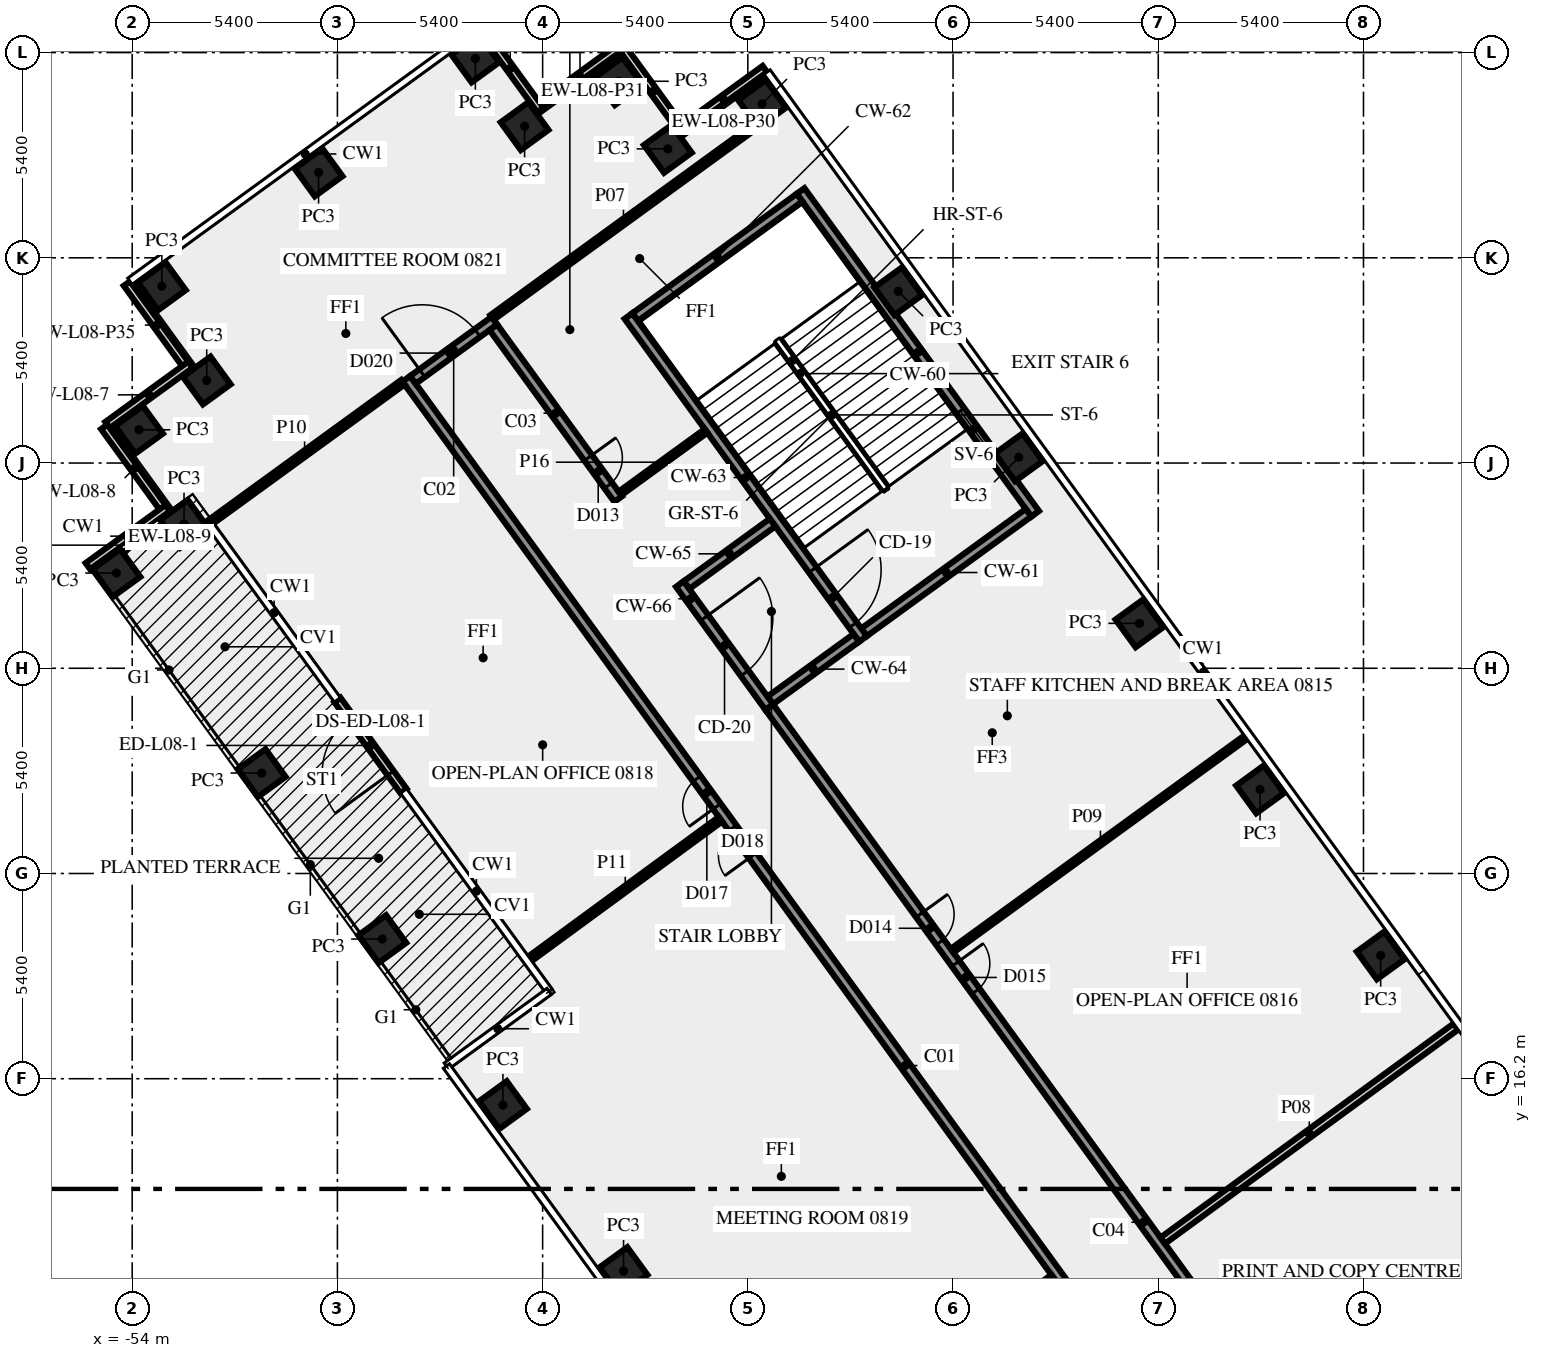
"""IFC4 building model, lengths in metres.
Left out: names, types, materials, properties, quantities, classifications, styles, units other than length and angle.
Written with IfcOpenShell. Run it as: python <this file> out.ifc"""

import sys

from ifc_helpers import new_model, si_unit, direction, frame, frame_2d, origin, origin_2d, place, context, subcontext, project, spatial, rectangle, extrude, element, fill, save


model = new_model("IFC4")
c1 = context("Model", 3, precision=1e-05, world=origin(), true_north=direction((0.0, 1.0)))
c2 = subcontext(c1, "Body", "Model", "MODEL_VIEW")
j1 = project(units=[si_unit("LENGTHUNIT", "METRE"), si_unit("PLANEANGLEUNIT", "RADIAN")], contexts=[c1])
p1 = place(None, origin())
s1 = spatial("IfcSite", under=j1, at=p1, CompositionType="ELEMENT")
p2 = place(p1, origin())
s2 = spatial("IfcBuilding", under=s1, at=p2, CompositionType="ELEMENT")
p3 = place(p2, frame((0.0, 0.0, 39.0)))
s3 = spatial("IfcBuildingStorey", under=s2, at=p3, CompositionType="ELEMENT", Elevation=39.0)
for number, where, z_axis, x_axis in (
    (1, (-21.147, 19.444, 0.0), (0.0, 0.0, 1.0), (-0.588, 0.809, 0.0)),
    (2, (-24.321, 23.812, 0.0), (0.0, 0.0, 1.0), (-0.588, 0.809, 0.0)),
    (3, (-27.495, 28.181, 0.0), (0.0, 0.0, 1.0), (-0.588, 0.809, 0.0)),
    (4, (-30.669, 32.55, 0.0), (0.0, 0.0, 1.0), (-0.588, 0.809, 0.0)),
    (5, (-33.843, 36.919, 0.0), (0.0, 0.0, 1.0), (-0.588, 0.809, 0.0)),
    (6, (-37.425, 41.85, 0.0), (0.0, 0.0, 1.0), (-0.588, 0.809, 0.0)),
    (7, (-39.906, 40.666, 0.0), (0.0, 0.0, 1.0), (-0.588, 0.809, 0.0)),
    (8, (-41.2, 42.445, 0.0), (0.0, 0.0, 1.0), (-0.588, 0.809, 0.0)),
    (9, (-43.675, 41.265, 0.0), (0.0, 0.0, 1.0), (-0.809, -0.588, 0.0)),
    (10, (-44.97, 43.045, 0.0), (0.0, 0.0, 1.0), (-0.809, -0.588, 0.0)),
    (11, (-49.096, 40.047, 0.0), (0.0, 0.0, 1.0), (-0.809, -0.588, 0.0)),
    (12, (-53.22, 37.05, 0.0), (0.0, 0.0, 1.0), (0.588, -0.809, 0.0)),
    (13, (-52.039, 34.571, 0.0), (0.0, 0.0, 1.0), (-0.809, -0.588, 0.0)),
    (14, (-53.82, 33.275, 0.0), (0.0, 0.0, 1.0), (0.588, -0.809, 0.0)),
    (15, (-52.636, 30.8, 0.0), (0.0, 0.0, 1.0), (-0.809, -0.588, 0.0)),
    (16, (-54.415, 29.505, 0.0), (0.0, 0.0, 1.0), (0.588, -0.809, 0.0)),
    (17, (-50.592, 24.243, 0.0), (0.0, 0.0, 1.0), (0.588, -0.809, 0.0)),
    (18, (-47.418, 19.875, 0.0), (0.0, 0.0, 1.0), (0.588, -0.809, 0.0)),
    (19, (-44.244, 15.506, 0.0), (0.0, 0.0, 1.0), (0.588, -0.809, 0.0)),
    (20, (-41.07, 11.137, 0.0), (0.0, 0.0, 1.0), (0.588, -0.809, 0.0)),
):
    element("IfcColumn", number, at=place(p3, frame(where, z_axis=z_axis, x_axis=x_axis)), inside=s3, PredefinedType="COLUMN", context=c2, shape_type="SweptSolid", body=[
        extrude(rectangle(XDim=0.9, YDim=0.9, at=origin_2d()), origin(), (0.0, 0.0, 1.0), 3.65),
    ])
p4 = place(p3, frame((-37.353, 42.768, 0.0), z_axis=(0.0, 0.0, 1.0), x_axis=(-0.809033161865, -0.587762999008, 0.0)))
e21 = element("IfcWall", 21, at=p4, inside=s3, PredefinedType="SOLIDWALL", context=c2, shape_type="SweptSolid", body=[
    extrude(rectangle(XDim=2.7, YDim=0.2, at=frame_2d((1.35, 0.0))), origin(), (0.0, 0.0, 1.0), 3.65),
])
p5 = place(p3, frame((-39.488, 41.094, 0.0), z_axis=(0.0, 0.0, 1.0), x_axis=(-0.587806000234, 0.809001919707, 0.0)))
e22 = element("IfcWall", 22, at=p5, inside=s3, PredefinedType="SOLIDWALL", context=c2, shape_type="SweptSolid", body=[
    extrude(rectangle(XDim=2.7, YDim=0.2, at=frame_2d((1.35, 0.0))), origin(), (0.0, 0.0, 1.0), 3.65),
])
for number, where, z_axis, x_axis in (
    (23, (-41.124, 43.366, 0.0), (0.0, 0.0, 1.0), (-0.809, -0.588, 0.0)),
    (24, (-43.259, 41.691, 0.0), (0.0, 0.0, 1.0), (-0.588, 0.809, 0.0)),
    (25, (-54.14, 37.123, 0.0), (0.0, 0.0, 1.0), (0.588, -0.809, 0.0)),
):
    element("IfcWall", number, at=place(p3, frame(where, z_axis=z_axis, x_axis=x_axis)), inside=s3, PredefinedType="SOLIDWALL", context=c2, shape_type="SweptSolid", body=[
        extrude(rectangle(XDim=2.7, YDim=0.2, at=frame_2d((1.35, 0.0))), origin(), (0.0, 0.0, 1.0), 3.65),
    ])
p6 = place(p3, frame((-46.859, 23.771, 0.0), z_axis=(0.0, 0.0, 1.0), x_axis=(-0.587789508047, 0.809013902371, 0.0)))
e26 = element("IfcWall", 26, at=p6, inside=s3, PredefinedType="SOLIDWALL", context=c2, shape_type="SweptSolid", body=[
    extrude(rectangle(XDim=2.963, YDim=0.2, at=frame_2d((1.481, 0.0))), origin(), (0.0, 0.0, 1.0), 3.65),
])
p7 = place(p6, frame((0.582, 0.0, 0.0)))
e27 = element("IfcOpeningElement", 27, at=p7, cuts=e26, PredefinedType="OPENING", context=c2, shape_type="SweptSolid", body=[
    extrude(rectangle(XDim=1.8, YDim=2.4, at=frame_2d((0.9, 1.2))), frame((0.0, 0.11, 0.0), z_axis=(0.0, -1.0, 0.0), x_axis=(1.0, 0.0, 0.0)), (0.0, 0.0, 1.0), 0.22),
])
p8 = place(p3, frame((-52.465, 34.987, 0.0), z_axis=(0.0, 0.0, 1.0), x_axis=(-0.809033161865, -0.587762999008, 0.0)))
e28 = element("IfcWall", 28, at=p8, inside=s3, PredefinedType="SOLIDWALL", context=c2, shape_type="SweptSolid", body=[
    extrude(rectangle(XDim=2.7, YDim=0.2, at=frame_2d((1.35, 0.0))), origin(), (0.0, 0.0, 1.0), 3.65),
])
p9 = place(p3, frame((-54.738, 33.351, 0.0), z_axis=(0.0, 0.0, 1.0), x_axis=(0.587779184282, -0.809021403008, 0.0)))
e29 = element("IfcWall", 29, at=p9, inside=s3, PredefinedType="SOLIDWALL", context=c2, shape_type="SweptSolid", body=[
    extrude(rectangle(XDim=2.7, YDim=0.2, at=frame_2d((1.35, 0.0))), origin(), (0.0, 0.0, 1.0), 3.65),
])
p10 = place(p3, frame((-53.063, 31.216, 0.0), z_axis=(0.0, 0.0, 1.0), x_axis=(-0.80902431253, -0.587775179585, 0.0)))
e30 = element("IfcWall", 30, at=p10, inside=s3, PredefinedType="SOLIDWALL", context=c2, shape_type="SweptSolid", body=[
    extrude(rectangle(XDim=2.6, YDim=0.2, at=frame_2d((1.3, 0.0))), origin(), (0.0, 0.0, 1.0), 3.65),
])
p11 = place(p3, frame((-30.24, 31.064, 0.0), z_axis=(0.0, 0.0, 1.0), x_axis=(-0.587795589702, 0.809009483706, 0.0)))
e31 = element("IfcWall", 31, at=p11, inside=s3, PredefinedType="SHEAR", context=c2, shape_type="SweptSolid", body=[
    extrude(rectangle(XDim=10.5, YDim=0.25, at=frame_2d((5.25, 0.0))), origin(), (0.0, 0.0, 1.0), 3.65),
])
p12 = place(p11, frame((2.15, 0.0, 1.0)))
e32 = element("IfcOpeningElement", 32, at=p12, cuts=e31, PredefinedType="OPENING", context=c2, shape_type="SweptSolid", body=[
    extrude(rectangle(XDim=1.2, YDim=1.2, at=frame_2d((0.6, 0.6))), frame((0.0, 0.135, 0.0), z_axis=(0.0, -1.0, 0.0), x_axis=(1.0, 0.0, 0.0)), (0.0, 0.0, 1.0), 0.27),
])
p13 = place(p3, frame((-30.414, 31.092, 0.0), z_axis=(0.0, 0.0, 1.0), x_axis=(-0.8089984606, -0.587810760999, 0.0)))
e33 = element("IfcWall", 33, at=p13, inside=s3, PredefinedType="SHEAR", context=c2, shape_type="SweptSolid", body=[
    extrude(rectangle(XDim=5.35, YDim=0.25, at=frame_2d((2.675, 0.0))), origin(), (0.0, 0.0, 1.0), 3.65),
])
p14 = place(p3, frame((-36.439, 39.384, 0.0), z_axis=(0.0, 0.0, 1.0), x_axis=(-0.809020161303, -0.587780893365, 0.0)))
e34 = element("IfcWall", 34, at=p14, inside=s3, PredefinedType="SHEAR", context=c2, shape_type="SweptSolid", body=[
    extrude(rectangle(XDim=5.35, YDim=0.25, at=frame_2d((2.675, 0.0))), origin(), (0.0, 0.0, 1.0), 3.65),
])
p15 = place(p3, frame((-40.942, 36.267, 0.0), z_axis=(0.0, 0.0, 1.0), x_axis=(0.587795589702, -0.809009483706, 0.0)))
e35 = element("IfcWall", 35, at=p15, inside=s3, PredefinedType="SHEAR", context=c2, shape_type="SweptSolid", body=[
    extrude(rectangle(XDim=10.5, YDim=0.25, at=frame_2d((5.25, 0.0))), origin(), (0.0, 0.0, 1.0), 3.65),
])
p16 = place(p15, frame((8.25, 0.0, 0.0)))
e36 = element("IfcOpeningElement", 36, at=p16, cuts=e35, PredefinedType="OPENING", context=c2, shape_type="SweptSolid", body=[
    extrude(rectangle(XDim=1.8, YDim=2.1, at=frame_2d((0.9, 1.05))), frame((0.0, 0.135, 0.0), z_axis=(0.0, -1.0, 0.0), x_axis=(1.0, 0.0, 0.0)), (0.0, 0.0, 1.0), 0.27),
])
for number, where, z_axis, x_axis in (
    (37, (-34.945, 27.8, 0.0), (0.0, 0.0, 1.0), (-0.809, -0.588, 0.0)),
    (38, (-37.149, 30.834, 0.0), (0.0, 0.0, 1.0), (-0.809, -0.588, 0.0)),
):
    element("IfcWall", number, at=place(p3, frame(where, z_axis=z_axis, x_axis=x_axis)), inside=s3, PredefinedType="SHEAR", context=c2, shape_type="SweptSolid", body=[
        extrude(rectangle(XDim=2.8, YDim=0.25, at=frame_2d((1.4, 0.0))), origin(), (0.0, 0.0, 1.0), 3.65),
    ])
p17 = place(p3, frame((-39.589, 29.216, 0.0), z_axis=(0.0, 0.0, 1.0), x_axis=(0.587772420479, -0.809026317077, 0.0)))
e39 = element("IfcWall", 39, at=p17, inside=s3, PredefinedType="SHEAR", context=c2, shape_type="SweptSolid", body=[
    extrude(rectangle(XDim=4.0, YDim=0.25, at=frame_2d((2.0, 0.0))), origin(), (0.0, 0.0, 1.0), 3.65),
])
p18 = place(p17, frame((1.1, 0.0, 0.0)))
e40 = element("IfcOpeningElement", 40, at=p18, cuts=e39, PredefinedType="OPENING", context=c2, shape_type="SweptSolid", body=[
    extrude(rectangle(XDim=1.8, YDim=2.1, at=frame_2d((0.9, 1.05))), frame((0.0, 0.135, 0.0), z_axis=(0.0, -1.0, 0.0), x_axis=(1.0, 0.0, 0.0)), (0.0, 0.0, 1.0), 0.27),
])
p19 = place(p3, frame((-20.531, -1.523, 0.0), z_axis=(0.0, 0.0, 1.0), x_axis=(-0.587784593204, 0.809017473231, 0.0)))
e41 = element("IfcWall", 41, at=p19, inside=s3, PredefinedType="SOLIDWALL", context=c2, shape_type="SweptSolid", body=[
    extrude(rectangle(XDim=44.67, YDim=0.25, at=frame_2d((22.335, 0.0))), origin(), (0.0, 0.0, 1.0), 3.65),
])
p20 = place(p19, frame((30.765, 0.0, 0.0)))
e42 = element("IfcOpeningElement", 42, at=p20, cuts=e41, PredefinedType="OPENING", context=c2, shape_type="SweptSolid", body=[
    extrude(rectangle(XDim=0.9, YDim=2.1, at=frame_2d((0.45, 1.05))), frame((0.0, 0.135, 0.0), z_axis=(0.0, -1.0, 0.0), x_axis=(1.0, 0.0, 0.0)), (0.0, 0.0, 1.0), 0.27),
])
p21 = place(p19, frame((14.316, 0.0, 0.0)))
e43 = element("IfcOpeningElement", 43, at=p21, cuts=e41, PredefinedType="OPENING", context=c2, shape_type="SweptSolid", body=[
    extrude(rectangle(XDim=0.9, YDim=2.1, at=frame_2d((0.45, 1.05))), frame((0.0, 0.135, 0.0), z_axis=(0.0, -1.0, 0.0), x_axis=(1.0, 0.0, 0.0)), (0.0, 0.0, 1.0), 0.27),
])
p22 = place(p19, frame((29.166, 0.0, 0.0)))
e44 = element("IfcOpeningElement", 44, at=p22, cuts=e41, PredefinedType="OPENING", context=c2, shape_type="SweptSolid", body=[
    extrude(rectangle(XDim=0.9, YDim=2.1, at=frame_2d((0.45, 1.05))), frame((0.0, 0.135, 0.0), z_axis=(0.0, -1.0, 0.0), x_axis=(1.0, 0.0, 0.0)), (0.0, 0.0, 1.0), 0.27),
])
p23 = place(p3, frame((-46.613, 34.588, 0.0), z_axis=(0.0, 0.0, 1.0), x_axis=(0.808994936898, 0.587815610607, 0.0)))
e45 = element("IfcWall", 45, at=p23, inside=s3, PredefinedType="SOLIDWALL", context=c2, shape_type="SweptSolid", body=[
    extrude(rectangle(XDim=2.65, YDim=0.25, at=frame_2d((1.325, 0.0))), origin(), (0.0, 0.0, 1.0), 3.65),
])
p24 = place(p23, frame((0.299, 0.0, 0.0)))
e46 = element("IfcOpeningElement", 46, at=p24, cuts=e45, PredefinedType="OPENING", context=c2, shape_type="SweptSolid", body=[
    extrude(rectangle(XDim=1.8, YDim=2.1, at=frame_2d((0.9, 1.05))), frame((0.0, 0.135, 0.0), z_axis=(0.0, -1.0, 0.0), x_axis=(1.0, 0.0, 0.0)), (0.0, 0.0, 1.0), 0.27),
])
p25 = place(p3, frame((-44.497, 35.971, 0.0), z_axis=(0.0, 0.0, 1.0), x_axis=(0.587742866856, -0.809047787501, 0.0)))
e47 = element("IfcWall", 47, at=p25, inside=s3, PredefinedType="SOLIDWALL", context=c2, shape_type="SweptSolid", body=[
    extrude(rectangle(XDim=5.586, YDim=0.25, at=frame_2d((2.793, 0.0))), origin(), (0.0, 0.0, 1.0), 3.65),
])
p26 = place(p25, frame((4.245, 0.0, 0.0)))
e48 = element("IfcOpeningElement", 48, at=p26, cuts=e47, PredefinedType="OPENING", context=c2, shape_type="SweptSolid", body=[
    extrude(rectangle(XDim=0.9, YDim=2.1, at=frame_2d((0.45, 1.05))), frame((0.0, 0.135, 0.0), z_axis=(0.0, -1.0, 0.0), x_axis=(1.0, 0.0, 0.0)), (0.0, 0.0, 1.0), 0.27),
])
p27 = place(p3, frame((-37.232, 25.972, 0.0), z_axis=(0.0, 0.0, 1.0), x_axis=(0.587786323093, -0.809016216391, 0.0)))
e49 = element("IfcWall", 49, at=p27, inside=s3, PredefinedType="SOLIDWALL", context=c2, shape_type="SweptSolid", body=[
    extrude(rectangle(XDim=33.493, YDim=0.25, at=frame_2d((16.747, 0.0))), origin(), (0.0, 0.0, 1.0), 3.65),
])
p28 = place(p27, frame((8.335, 0.0, 0.0)))
e50 = element("IfcOpeningElement", 50, at=p28, cuts=e49, PredefinedType="OPENING", context=c2, shape_type="SweptSolid", body=[
    extrude(rectangle(XDim=0.9, YDim=2.1, at=frame_2d((0.45, 1.05))), frame((0.0, 0.135, 0.0), z_axis=(0.0, -1.0, 0.0), x_axis=(1.0, 0.0, 0.0)), (0.0, 0.0, 1.0), 0.27),
])
p29 = place(p27, frame((29.152, 0.0, 0.0)))
e51 = element("IfcOpeningElement", 51, at=p29, cuts=e49, PredefinedType="OPENING", context=c2, shape_type="SweptSolid", body=[
    extrude(rectangle(XDim=0.9, YDim=2.1, at=frame_2d((0.45, 1.05))), frame((0.0, 0.135, 0.0), z_axis=(0.0, -1.0, 0.0), x_axis=(1.0, 0.0, 0.0)), (0.0, 0.0, 1.0), 0.27),
])
p30 = place(p27, frame((6.735, 0.0, 0.0)))
e52 = element("IfcOpeningElement", 52, at=p30, cuts=e49, PredefinedType="OPENING", context=c2, shape_type="SweptSolid", body=[
    extrude(rectangle(XDim=0.9, YDim=2.1, at=frame_2d((0.45, 1.05))), frame((0.0, 0.135, 0.0), z_axis=(0.0, -1.0, 0.0), x_axis=(1.0, 0.0, 0.0)), (0.0, 0.0, 1.0), 0.27),
])
p31 = place(p3, frame((-37.614, 41.257, 0.0), z_axis=(0.0, 0.0, 1.0), x_axis=(-0.808968150799, -0.587852473834, 0.0)))
e53 = element("IfcWall", 53, at=p31, inside=s3, PredefinedType="PARTITIONING", context=c2, shape_type="SweptSolid", body=[
    extrude(rectangle(XDim=8.55, YDim=0.15, at=frame_2d((4.275, 0.0))), origin(), (0.0, 0.0, 1.0), 3.65),
])
p32 = place(p3, frame((-26.882, 11.94, 0.0), z_axis=(0.0, 0.0, 1.0), x_axis=(0.807664588563, 0.589642190131, 0.0)))
e54 = element("IfcWall", 54, at=p32, inside=s3, PredefinedType="SOLIDWALL", context=c2, shape_type="SweptSolid", body=[
    extrude(rectangle(XDim=9.55, YDim=0.2, at=frame_2d((4.775, 0.0))), origin(), (0.0, 0.0, 1.0), 2.75),
])
p33 = place(p3, frame((-24.618, 25.242, 0.0), z_axis=(0.0, 0.0, 1.0), x_axis=(-0.809002920164, -0.587804623294, 0.0)))
e55 = element("IfcWall", 55, at=p33, inside=s3, PredefinedType="PARTITIONING", context=c2, shape_type="SweptSolid", body=[
    extrude(rectangle(XDim=9.651, YDim=0.12, at=frame_2d((4.825, 0.0))), origin(), (0.0, 0.0, 1.0), 2.75),
])
p34 = place(p3, frame((-46.877, 34.526, 0.0), z_axis=(0.0, 0.0, 1.0), x_axis=(-0.808980373315, -0.587835653556, 0.0)))
e56 = element("IfcWall", 56, at=p34, inside=s3, PredefinedType="PARTITIONING", context=c2, shape_type="SweptSolid", body=[
    extrude(rectangle(XDim=6.394, YDim=0.15, at=frame_2d((3.197, 0.0))), origin(), (0.0, 0.0, 1.0), 3.65),
])
p35 = place(p3, frame((-43.529, 19.358, 0.0), z_axis=(0.0, 0.0, 1.0), x_axis=(0.806712484859, 0.590944131685, 0.0)))
e57 = element("IfcWall", 57, at=p35, inside=s3, PredefinedType="PARTITIONING", context=c2, shape_type="SweptSolid", body=[
    extrude(rectangle(XDim=6.207, YDim=0.15, at=frame_2d((3.104, 0.0))), origin(), (0.0, 0.0, 1.0), 3.65),
])
p36 = place(p3, frame((-29.769, 10.98, 0.0), z_axis=(0.0, 0.0, 1.0), x_axis=(-0.809036661777, -0.587758181483, 0.0)))
e58 = element("IfcWall", 58, at=p36, inside=s3, PredefinedType="PARTITIONING", context=c2, shape_type="SweptSolid", body=[
    extrude(rectangle(XDim=9.55, YDim=0.15, at=frame_2d((4.775, 0.0))), origin(), (0.0, 0.0, 1.0), 2.75),
])
p37 = place(p3, frame((-41.166, 31.599, 0.0), z_axis=(0.0, 0.0, 1.0), x_axis=(0.809090262332, 0.587684394381, 0.0)))
e59 = element("IfcWall", 59, at=p37, inside=s3, PredefinedType="PARTITIONING", context=c2, shape_type="SweptSolid", body=[
    extrude(rectangle(XDim=2.801, YDim=0.12, at=frame_2d((1.4, 0.0))), origin(), (0.0, 0.0, 1.0), 3.65),
])
p38 = place(p7, origin())
e60 = element("IfcDoor", 60, at=p38, inside=s3, OperationType="DOUBLE_DOOR_SINGLE_SWING", PredefinedType="DOOR", context=c2, shape_type="SweptSolid", body=[
    extrude(rectangle(XDim=1.8, YDim=2.4, at=frame_2d((0.9, 1.2))), frame((0.0, 0.025, 0.0), z_axis=(0.0, -1.0, 0.0), x_axis=(1.0, 0.0, 0.0)), (0.0, 0.0, 1.0), 0.05),
])
fill(e27, e60)
p39 = place(p12, origin())
e61 = element("IfcWindow", 61, at=p39, inside=s3, PartitioningType="SINGLE_PANEL", PredefinedType="WINDOW", context=c2, shape_type="SweptSolid", body=[
    extrude(rectangle(XDim=1.2, YDim=1.2, at=frame_2d((0.6, 0.6))), frame((0.0, 0.03, 0.0), z_axis=(0.0, -1.0, 0.0), x_axis=(1.0, 0.0, 0.0)), (0.0, 0.0, 1.0), 0.06),
])
fill(e32, e61)
p40 = place(p16, origin())
e62 = element("IfcDoor", 62, at=p40, inside=s3, OperationType="DOUBLE_DOOR_SINGLE_SWING", PredefinedType="DOOR", context=c2, shape_type="SweptSolid", body=[
    extrude(rectangle(XDim=1.8, YDim=2.1, at=frame_2d((0.9, 1.05))), frame((0.0, 0.025, 0.0), z_axis=(0.0, -1.0, 0.0), x_axis=(1.0, 0.0, 0.0)), (0.0, 0.0, 1.0), 0.05),
])
fill(e36, e62)
p41 = place(p18, origin())
e63 = element("IfcDoor", 63, at=p41, inside=s3, OperationType="DOUBLE_DOOR_SINGLE_SWING", PredefinedType="DOOR", context=c2, shape_type="SweptSolid", body=[
    extrude(rectangle(XDim=1.8, YDim=2.1, at=frame_2d((0.9, 1.05))), frame((0.0, 0.025, 0.0), z_axis=(0.0, -1.0, 0.0), x_axis=(1.0, 0.0, 0.0)), (0.0, 0.0, 1.0), 0.05),
])
fill(e40, e63)
p42 = place(p26, origin())
e64 = element("IfcDoor", 64, at=p42, inside=s3, OperationType="SINGLE_SWING_RIGHT", PredefinedType="DOOR", context=c2, shape_type="SweptSolid", body=[
    extrude(rectangle(XDim=0.9, YDim=2.1, at=frame_2d((0.45, 1.05))), frame((0.0, 0.025, 0.0), z_axis=(0.0, -1.0, 0.0), x_axis=(1.0, 0.0, 0.0)), (0.0, 0.0, 1.0), 0.05),
])
fill(e48, e64)
p43 = place(p28, origin())
e65 = element("IfcDoor", 65, at=p43, inside=s3, OperationType="SINGLE_SWING_LEFT", PredefinedType="DOOR", context=c2, shape_type="SweptSolid", body=[
    extrude(rectangle(XDim=0.9, YDim=2.1, at=frame_2d((0.45, 1.05))), frame((0.0, 0.025, 0.0), z_axis=(0.0, -1.0, 0.0), x_axis=(1.0, 0.0, 0.0)), (0.0, 0.0, 1.0), 0.05),
])
fill(e50, e65)
p44 = place(p20, origin())
e66 = element("IfcDoor", 66, at=p44, inside=s3, OperationType="SINGLE_SWING_LEFT", PredefinedType="DOOR", context=c2, shape_type="SweptSolid", body=[
    extrude(rectangle(XDim=0.9, YDim=2.1, at=frame_2d((0.45, 1.05))), frame((0.0, 0.025, 0.0), z_axis=(0.0, -1.0, 0.0), x_axis=(1.0, 0.0, 0.0)), (0.0, 0.0, 1.0), 0.05),
])
fill(e42, e66)
p45 = place(p24, origin())
e67 = element("IfcDoor", 67, at=p45, inside=s3, OperationType="DOUBLE_DOOR_SINGLE_SWING", PredefinedType="DOOR", context=c2, shape_type="SweptSolid", body=[
    extrude(rectangle(XDim=1.8, YDim=2.1, at=frame_2d((0.9, 1.05))), frame((0.0, 0.025, 0.0), z_axis=(0.0, -1.0, 0.0), x_axis=(1.0, 0.0, 0.0)), (0.0, 0.0, 1.0), 0.05),
])
fill(e46, e67)
p46 = place(p22, origin())
e68 = element("IfcDoor", 68, at=p46, inside=s3, OperationType="SINGLE_SWING_RIGHT", PredefinedType="DOOR", context=c2, shape_type="SweptSolid", body=[
    extrude(rectangle(XDim=0.9, YDim=2.1, at=frame_2d((0.45, 1.05))), frame((0.0, 0.025, 0.0), z_axis=(0.0, -1.0, 0.0), x_axis=(1.0, 0.0, 0.0)), (0.0, 0.0, 1.0), 0.05),
])
fill(e44, e68)
p47 = place(p30, origin())
e69 = element("IfcDoor", 69, at=p47, inside=s3, OperationType="SINGLE_SWING_RIGHT", PredefinedType="DOOR", context=c2, shape_type="SweptSolid", body=[
    extrude(rectangle(XDim=0.9, YDim=2.1, at=frame_2d((0.45, 1.05))), frame((0.0, 0.025, 0.0), z_axis=(0.0, -1.0, 0.0), x_axis=(1.0, 0.0, 0.0)), (0.0, 0.0, 1.0), 0.05),
])
fill(e52, e69)
save(model, sys.argv[1])
